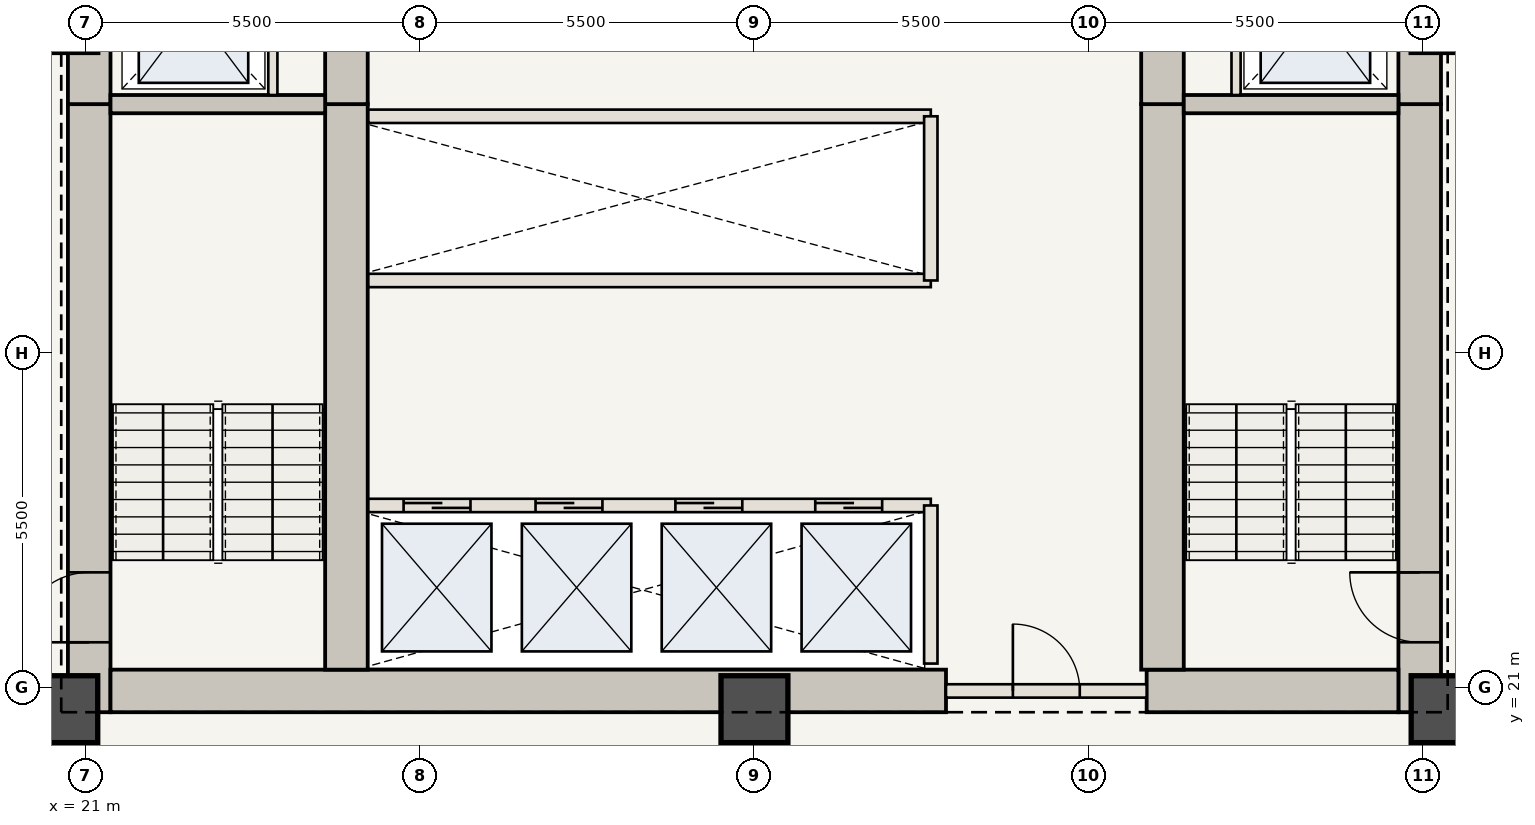
"""IFC4 building model, lengths in metres.
Left out: names, types, materials, properties, quantities, classifications, styles, units other than length and angle.
Written with IfcOpenShell. Run it as: python <this file> out.ifc"""

import sys

from ifc_helpers import new_model, si_unit, direction, frame, frame_2d, origin, origin_2d, place, context, subcontext, project, spatial, rectangle, extrude, element, fill, save


model = new_model("IFC4")
c1 = context("Model", 3, precision=1e-05, world=origin(), true_north=direction((0.0, 1.0)))
c2 = subcontext(c1, "Body", "Model", "MODEL_VIEW")
j1 = project(units=[si_unit("LENGTHUNIT", "METRE"), si_unit("PLANEANGLEUNIT", "RADIAN")], contexts=[c1])
p1 = place(None, origin())
s1 = spatial("IfcSite", under=j1, at=p1, CompositionType="ELEMENT")
p2 = place(p1, origin())
s2 = spatial("IfcBuilding", under=s1, at=p2, CompositionType="ELEMENT")
p3 = place(p2, frame((0.0, 0.0, 73.85)))
s3 = spatial("IfcBuildingStorey", under=s2, at=p3, CompositionType="ELEMENT", Elevation=73.85)
p4 = place(p3, frame((21.06, 20.6, 0.0), z_axis=(0.0, 0.0, 1.0), x_axis=(0.0, 1.0, 0.0)))
e1 = element("IfcWall", 1, at=p4, inside=s3, PredefinedType="SHEAR", context=c2, shape_type="SweptSolid", body=[
    extrude(rectangle(XDim=10.0, YDim=0.7, at=frame_2d((5.0, 0.0))), origin(), (0.0, 0.0, 1.0), 3.5),
])
p5 = place(p4, frame((1.15, 0.0, 0.0)))
e2 = element("IfcOpeningElement", 2, at=p5, cuts=e1, PredefinedType="OPENING", context=c2, shape_type="SweptSolid", body=[
    extrude(rectangle(XDim=1.15, YDim=2.15, at=frame_2d((0.575, 1.075))), frame((0.0, 0.36, 0.0), z_axis=(0.0, -1.0, 0.0), x_axis=(1.0, 0.0, 0.0)), (0.0, 0.0, 1.0), 0.72),
])
p6 = place(p3, frame((21.06, 30.6, 0.0), z_axis=(0.0, 0.0, 1.0), x_axis=(0.0, 1.0, 0.0)))
e3 = element("IfcWall", 3, at=p6, inside=s3, PredefinedType="SHEAR", context=c2, shape_type="SweptSolid", body=[
    extrude(rectangle(XDim=12.75, YDim=0.7, at=frame_2d((6.375, 0.0))), origin(), (0.0, 0.0, 1.0), 3.5),
])
p7 = place(p6, frame((4.2, 0.0, 0.0)))
e4 = element("IfcOpeningElement", 4, at=p7, cuts=e3, PredefinedType="OPENING", context=c2, shape_type="SweptSolid", body=[
    extrude(rectangle(XDim=1.1, YDim=2.15, at=frame_2d((0.55, 1.075))), frame((0.0, 0.36, 0.0), z_axis=(0.0, -1.0, 0.0), x_axis=(1.0, 0.0, 0.0)), (0.0, 0.0, 1.0), 0.72),
])
p8 = place(p6, frame((9.2, 0.0, 0.0)))
e5 = element("IfcOpeningElement", 5, at=p8, cuts=e3, PredefinedType="OPENING", context=c2, shape_type="SweptSolid", body=[
    extrude(rectangle(XDim=0.92, YDim=2.1, at=frame_2d((0.46, 1.05))), frame((0.0, 0.36, 0.0), z_axis=(0.0, -1.0, 0.0), x_axis=(1.0, 0.0, 0.0)), (0.0, 0.0, 1.0), 0.72),
])
p9 = place(p3, frame((42.94, 20.6, 0.0), z_axis=(0.0, 0.0, 1.0), x_axis=(0.0, 1.0, 0.0)))
e6 = element("IfcWall", 6, at=p9, inside=s3, PredefinedType="SHEAR", context=c2, shape_type="SweptSolid", body=[
    extrude(rectangle(XDim=10.0, YDim=0.7, at=frame_2d((5.0, 0.0))), origin(), (0.0, 0.0, 1.0), 3.5),
])
p10 = place(p9, frame((1.15, 0.0, 0.0)))
e7 = element("IfcOpeningElement", 7, at=p10, cuts=e6, PredefinedType="OPENING", context=c2, shape_type="SweptSolid", body=[
    extrude(rectangle(XDim=1.15, YDim=2.15, at=frame_2d((0.575, 1.075))), frame((0.0, 0.36, 0.0), z_axis=(0.0, -1.0, 0.0), x_axis=(1.0, 0.0, 0.0)), (0.0, 0.0, 1.0), 0.72),
])
p11 = place(p3, frame((42.94, 30.6, 0.0), z_axis=(0.0, 0.0, 1.0), x_axis=(0.0, 1.0, 0.0)))
e8 = element("IfcWall", 8, at=p11, inside=s3, PredefinedType="SHEAR", context=c2, shape_type="SweptSolid", body=[
    extrude(rectangle(XDim=12.75, YDim=0.7, at=frame_2d((6.375, 0.0))), origin(), (0.0, 0.0, 1.0), 3.5),
])
p12 = place(p11, frame((4.2, 0.0, 0.0)))
e9 = element("IfcOpeningElement", 9, at=p12, cuts=e8, PredefinedType="OPENING", context=c2, shape_type="SweptSolid", body=[
    extrude(rectangle(XDim=1.1, YDim=2.15, at=frame_2d((0.55, 1.075))), frame((0.0, 0.36, 0.0), z_axis=(0.0, -1.0, 0.0), x_axis=(1.0, 0.0, 0.0)), (0.0, 0.0, 1.0), 0.72),
])
p13 = place(p11, frame((8.05, 0.0, 0.0)))
e10 = element("IfcOpeningElement", 10, at=p13, cuts=e8, PredefinedType="OPENING", context=c2, shape_type="SweptSolid", body=[
    extrude(rectangle(XDim=0.88, YDim=2.1, at=frame_2d((0.44, 1.05))), frame((0.0, 0.36, 0.0), z_axis=(0.0, -1.0, 0.0), x_axis=(1.0, 0.0, 0.0)), (0.0, 0.0, 1.0), 0.72),
])
p14 = place(p11, frame((9.45, 0.0, 0.0)))
e11 = element("IfcOpeningElement", 11, at=p14, cuts=e8, PredefinedType="OPENING", context=c2, shape_type="SweptSolid", body=[
    extrude(rectangle(XDim=0.88, YDim=2.1, at=frame_2d((0.44, 1.05))), frame((0.0, 0.36, 0.0), z_axis=(0.0, -1.0, 0.0), x_axis=(1.0, 0.0, 0.0)), (0.0, 0.0, 1.0), 0.72),
])
p15 = place(p11, frame((10.85, 0.0, 0.0)))
e12 = element("IfcOpeningElement", 12, at=p15, cuts=e8, PredefinedType="OPENING", context=c2, shape_type="SweptSolid", body=[
    extrude(rectangle(XDim=0.88, YDim=2.1, at=frame_2d((0.44, 1.05))), frame((0.0, 0.36, 0.0), z_axis=(0.0, -1.0, 0.0), x_axis=(1.0, 0.0, 0.0)), (0.0, 0.0, 1.0), 0.72),
])
p16 = place(p3, frame((21.41, 20.95, 0.0), z_axis=(0.0, 0.0, 1.0), x_axis=(1.0, 0.0, 0.0)))
e13 = element("IfcWall", 13, at=p16, inside=s3, PredefinedType="SHEAR", context=c2, shape_type="SweptSolid", body=[
    extrude(rectangle(XDim=13.74, YDim=0.7, at=frame_2d((6.87, 0.0))), origin(), (0.0, 0.0, 1.0), 3.5),
])
p17 = place(p3, frame((38.45, 20.95, 0.0), z_axis=(0.0, 0.0, 1.0), x_axis=(1.0, 0.0, 0.0)))
e14 = element("IfcWall", 14, at=p17, inside=s3, PredefinedType="SHEAR", context=c2, shape_type="SweptSolid", body=[
    extrude(rectangle(XDim=4.14, YDim=0.7, at=frame_2d((2.07, 0.0))), origin(), (0.0, 0.0, 1.0), 3.5),
])
p18 = place(p3, frame((25.29, 21.3, 0.0), z_axis=(0.0, 0.0, 1.0), x_axis=(0.0, 1.0, 0.0)))
e15 = element("IfcWall", 15, at=p18, inside=s3, PredefinedType="SHEAR", context=c2, shape_type="SweptSolid", body=[
    extrude(rectangle(XDim=9.3, YDim=0.7, at=frame_2d((4.65, 0.0))), origin(), (0.0, 0.0, 1.0), 3.5),
])
p19 = place(p3, frame((25.29, 30.6, 0.0), z_axis=(0.0, 0.0, 1.0), x_axis=(0.0, 1.0, 0.0)))
e16 = element("IfcWall", 16, at=p19, inside=s3, PredefinedType="SHEAR", context=c2, shape_type="SweptSolid", body=[
    extrude(rectangle(XDim=12.05, YDim=0.7, at=frame_2d((6.025, 0.0))), origin(), (0.0, 0.0, 1.0), 3.5),
])
p20 = place(p19, frame((6.25, 0.0, 0.0)))
e17 = element("IfcOpeningElement", 17, at=p20, cuts=e16, PredefinedType="OPENING", context=c2, shape_type="SweptSolid", body=[
    extrude(rectangle(XDim=1.1, YDim=2.15, at=frame_2d((0.55, 1.075))), frame((0.0, 0.36, 0.0), z_axis=(0.0, -1.0, 0.0), x_axis=(1.0, 0.0, 0.0)), (0.0, 0.0, 1.0), 0.72),
])
p21 = place(p3, frame((38.71, 21.3, 0.0), z_axis=(0.0, 0.0, 1.0), x_axis=(0.0, 1.0, 0.0)))
e18 = element("IfcWall", 18, at=p21, inside=s3, PredefinedType="SHEAR", context=c2, shape_type="SweptSolid", body=[
    extrude(rectangle(XDim=9.3, YDim=0.7, at=frame_2d((4.65, 0.0))), origin(), (0.0, 0.0, 1.0), 3.5),
])
p22 = place(p3, frame((38.71, 30.6, 0.0), z_axis=(0.0, 0.0, 1.0), x_axis=(0.0, 1.0, 0.0)))
e19 = element("IfcWall", 19, at=p22, inside=s3, PredefinedType="SHEAR", context=c2, shape_type="SweptSolid", body=[
    extrude(rectangle(XDim=12.05, YDim=0.7, at=frame_2d((6.025, 0.0))), origin(), (0.0, 0.0, 1.0), 3.5),
])
for number, where, z_axis, x_axis in (
    (20, (20.65, 20.65, 0.0), (0.0, 0.0, 1.0), (1.0, 0.0, 0.0)),
    (21, (32.0, 20.65, 0.0), (0.0, 0.0, 1.0), (1.0, 0.0, 0.0)),
    (22, (43.35, 20.65, 0.0), (0.0, 0.0, 1.0), (1.0, 0.0, 0.0)),
):
    element("IfcColumn", number, at=place(p3, frame(where, z_axis=z_axis, x_axis=x_axis)), inside=s3, PredefinedType="COLUMN", context=c2, shape_type="SweptSolid", body=[
        extrude(rectangle(XDim=1.1, YDim=1.1, at=origin_2d()), origin(), (0.0, 0.0, 1.0), 3.5),
    ])
for number, where, z_axis, x_axis in (
    (23, (21.41, 30.6, 0.0), (0.0, 0.0, 1.0), (1.0, 0.0, 0.0)),
    (24, (39.06, 30.6, 0.0), (0.0, 0.0, 1.0), (1.0, 0.0, 0.0)),
):
    element("IfcWall", number, at=place(p3, frame(where, z_axis=z_axis, x_axis=x_axis)), inside=s3, PredefinedType="SHEAR", context=c2, shape_type="SweptSolid", body=[
        extrude(rectangle(XDim=3.53, YDim=0.3, at=frame_2d((1.765, 0.0))), origin(), (0.0, 0.0, 1.0), 3.24),
    ])
for number, where, z_axis, x_axis in (
    (25, (24.08, 30.75, 0.0), (0.0, 0.0, 1.0), (0.0, 1.0, 0.0)),
    (26, (39.92, 30.75, 0.0), (0.0, 0.0, 1.0), (0.0, 1.0, 0.0)),
):
    element("IfcWall", number, at=place(p3, frame(where, z_axis=z_axis, x_axis=x_axis)), inside=s3, PredefinedType="STANDARD", context=c2, shape_type="SweptSolid", body=[
        extrude(rectangle(XDim=2.65, YDim=0.15, at=frame_2d((1.325, 0.0))), origin(), (0.0, 0.0, 1.0), 3.24),
    ])
p23 = place(p3, frame((35.15, 20.95, 0.0), z_axis=(0.0, 0.0, 1.0), x_axis=(1.0, 0.0, 0.0)))
e27 = element("IfcWall", 27, at=p23, inside=s3, PredefinedType="STANDARD", context=c2, shape_type="SweptSolid", body=[
    extrude(rectangle(XDim=3.3, YDim=0.22, at=frame_2d((1.65, 0.0))), origin(), (0.0, 0.0, 1.0), 3.24),
])
p24 = place(p23, frame((1.1, 0.0, 0.0)))
e28 = element("IfcOpeningElement", 28, at=p24, cuts=e27, PredefinedType="OPENING", context=c2, shape_type="SweptSolid", body=[
    extrude(rectangle(XDim=1.1, YDim=2.15, at=frame_2d((0.55, 1.075))), frame((0.0, 0.12, 0.0), z_axis=(0.0, -1.0, 0.0), x_axis=(1.0, 0.0, 0.0)), (0.0, 0.0, 1.0), 0.24),
])
p25 = place(p3, frame((25.65, 24.0, 0.0), z_axis=(0.0, 0.0, 1.0), x_axis=(1.0, 0.0, 0.0)))
e29 = element("IfcWall", 29, at=p25, inside=s3, PredefinedType="STANDARD", context=c2, shape_type="SweptSolid", body=[
    extrude(rectangle(XDim=9.25, YDim=0.22, at=frame_2d((4.625, 0.0))), origin(), (0.0, 0.0, 1.0), 3.24),
])
p26 = place(p25, frame((0.58, 0.0, 0.0)))
e30 = element("IfcOpeningElement", 30, at=p26, cuts=e29, PredefinedType="OPENING", context=c2, shape_type="SweptSolid", body=[
    extrude(rectangle(XDim=1.1, YDim=2.15, at=frame_2d((0.55, 1.075))), frame((0.0, 0.12, 0.0), z_axis=(0.0, -1.0, 0.0), x_axis=(1.0, 0.0, 0.0)), (0.0, 0.0, 1.0), 0.24),
])
p27 = place(p25, frame((2.75, 0.0, 0.0)))
e31 = element("IfcOpeningElement", 31, at=p27, cuts=e29, PredefinedType="OPENING", context=c2, shape_type="SweptSolid", body=[
    extrude(rectangle(XDim=1.1, YDim=2.15, at=frame_2d((0.55, 1.075))), frame((0.0, 0.12, 0.0), z_axis=(0.0, -1.0, 0.0), x_axis=(1.0, 0.0, 0.0)), (0.0, 0.0, 1.0), 0.24),
])
p28 = place(p25, frame((5.05, 0.0, 0.0)))
e32 = element("IfcOpeningElement", 32, at=p28, cuts=e29, PredefinedType="OPENING", context=c2, shape_type="SweptSolid", body=[
    extrude(rectangle(XDim=1.1, YDim=2.15, at=frame_2d((0.55, 1.075))), frame((0.0, 0.12, 0.0), z_axis=(0.0, -1.0, 0.0), x_axis=(1.0, 0.0, 0.0)), (0.0, 0.0, 1.0), 0.24),
])
p29 = place(p25, frame((7.35, 0.0, 0.0)))
e33 = element("IfcOpeningElement", 33, at=p29, cuts=e29, PredefinedType="OPENING", context=c2, shape_type="SweptSolid", body=[
    extrude(rectangle(XDim=1.1, YDim=2.15, at=frame_2d((0.55, 1.075))), frame((0.0, 0.12, 0.0), z_axis=(0.0, -1.0, 0.0), x_axis=(1.0, 0.0, 0.0)), (0.0, 0.0, 1.0), 0.24),
])
p30 = place(p3, frame((34.9, 21.4, 0.0), z_axis=(0.0, 0.0, 1.0), x_axis=(0.0, 1.0, 0.0)))
e34 = element("IfcWall", 34, at=p30, inside=s3, PredefinedType="STANDARD", context=c2, shape_type="SweptSolid", body=[
    extrude(rectangle(XDim=2.6, YDim=0.22, at=frame_2d((1.3, 0.0))), origin(), (0.0, 0.0, 1.0), 3.24),
])
for number, where, z_axis, x_axis in (
    (35, (25.65, 27.7, 0.0), (0.0, 0.0, 1.0), (1.0, 0.0, 0.0)),
    (36, (25.65, 30.4, 0.0), (0.0, 0.0, 1.0), (1.0, 0.0, 0.0)),
):
    element("IfcWall", number, at=place(p3, frame(where, z_axis=z_axis, x_axis=x_axis)), inside=s3, PredefinedType="STANDARD", context=c2, shape_type="SweptSolid", body=[
        extrude(rectangle(XDim=9.25, YDim=0.22, at=frame_2d((4.625, 0.0))), origin(), (0.0, 0.0, 1.0), 3.24),
    ])
p31 = place(p3, frame((34.9, 27.7, 0.0), z_axis=(0.0, 0.0, 1.0), x_axis=(0.0, 1.0, 0.0)))
e37 = element("IfcWall", 37, at=p31, inside=s3, PredefinedType="STANDARD", context=c2, shape_type="SweptSolid", body=[
    extrude(rectangle(XDim=2.7, YDim=0.22, at=frame_2d((1.35, 0.0))), origin(), (0.0, 0.0, 1.0), 3.24),
])
p32 = place(p5, origin())
e38 = element("IfcDoor", 38, at=p32, inside=s3, OperationType="SINGLE_SWING_LEFT", PredefinedType="DOOR", context=c2, shape_type="SweptSolid", body=[
    extrude(rectangle(XDim=1.15, YDim=2.15, at=frame_2d((0.575, 1.075))), frame((0.0, 0.025, 0.0), z_axis=(0.0, -1.0, 0.0), x_axis=(1.0, 0.0, 0.0)), (0.0, 0.0, 1.0), 0.05),
])
fill(e2, e38)
p33 = place(p10, origin())
e39 = element("IfcDoor", 39, at=p33, inside=s3, OperationType="SINGLE_SWING_RIGHT", PredefinedType="DOOR", context=c2, shape_type="SweptSolid", body=[
    extrude(rectangle(XDim=1.15, YDim=2.15, at=frame_2d((0.575, 1.075))), frame((0.0, 0.025, 0.0), z_axis=(0.0, -1.0, 0.0), x_axis=(1.0, 0.0, 0.0)), (0.0, 0.0, 1.0), 0.05),
])
fill(e7, e39)
p34 = place(p24, origin())
e40 = element("IfcDoor", 40, at=p34, inside=s3, OperationType="SINGLE_SWING_LEFT", PredefinedType="DOOR", context=c2, shape_type="SweptSolid", body=[
    extrude(rectangle(XDim=1.1, YDim=2.15, at=frame_2d((0.55, 1.075))), frame((0.0, 0.025, 0.0), z_axis=(0.0, -1.0, 0.0), x_axis=(1.0, 0.0, 0.0)), (0.0, 0.0, 1.0), 0.05),
])
fill(e28, e40)
p35 = place(p26, origin())
e41 = element("IfcDoor", 41, at=p35, inside=s3, OperationType="DOUBLE_DOOR_SLIDING", PredefinedType="DOOR", context=c2, shape_type="SweptSolid", body=[
    extrude(rectangle(XDim=1.1, YDim=2.15, at=frame_2d((0.55, 1.075))), frame((0.0, 0.025, 0.0), z_axis=(0.0, -1.0, 0.0), x_axis=(1.0, 0.0, 0.0)), (0.0, 0.0, 1.0), 0.05),
])
fill(e30, e41)
p36 = place(p27, origin())
e42 = element("IfcDoor", 42, at=p36, inside=s3, OperationType="DOUBLE_DOOR_SLIDING", PredefinedType="DOOR", context=c2, shape_type="SweptSolid", body=[
    extrude(rectangle(XDim=1.1, YDim=2.15, at=frame_2d((0.55, 1.075))), frame((0.0, 0.025, 0.0), z_axis=(0.0, -1.0, 0.0), x_axis=(1.0, 0.0, 0.0)), (0.0, 0.0, 1.0), 0.05),
])
fill(e31, e42)
p37 = place(p28, origin())
e43 = element("IfcDoor", 43, at=p37, inside=s3, OperationType="DOUBLE_DOOR_SLIDING", PredefinedType="DOOR", context=c2, shape_type="SweptSolid", body=[
    extrude(rectangle(XDim=1.1, YDim=2.15, at=frame_2d((0.55, 1.075))), frame((0.0, 0.025, 0.0), z_axis=(0.0, -1.0, 0.0), x_axis=(1.0, 0.0, 0.0)), (0.0, 0.0, 1.0), 0.05),
])
fill(e32, e43)
p38 = place(p29, origin())
e44 = element("IfcDoor", 44, at=p38, inside=s3, OperationType="DOUBLE_DOOR_SLIDING", PredefinedType="DOOR", context=c2, shape_type="SweptSolid", body=[
    extrude(rectangle(XDim=1.1, YDim=2.15, at=frame_2d((0.55, 1.075))), frame((0.0, 0.025, 0.0), z_axis=(0.0, -1.0, 0.0), x_axis=(1.0, 0.0, 0.0)), (0.0, 0.0, 1.0), 0.05),
])
fill(e33, e44)
save(model, sys.argv[1])
